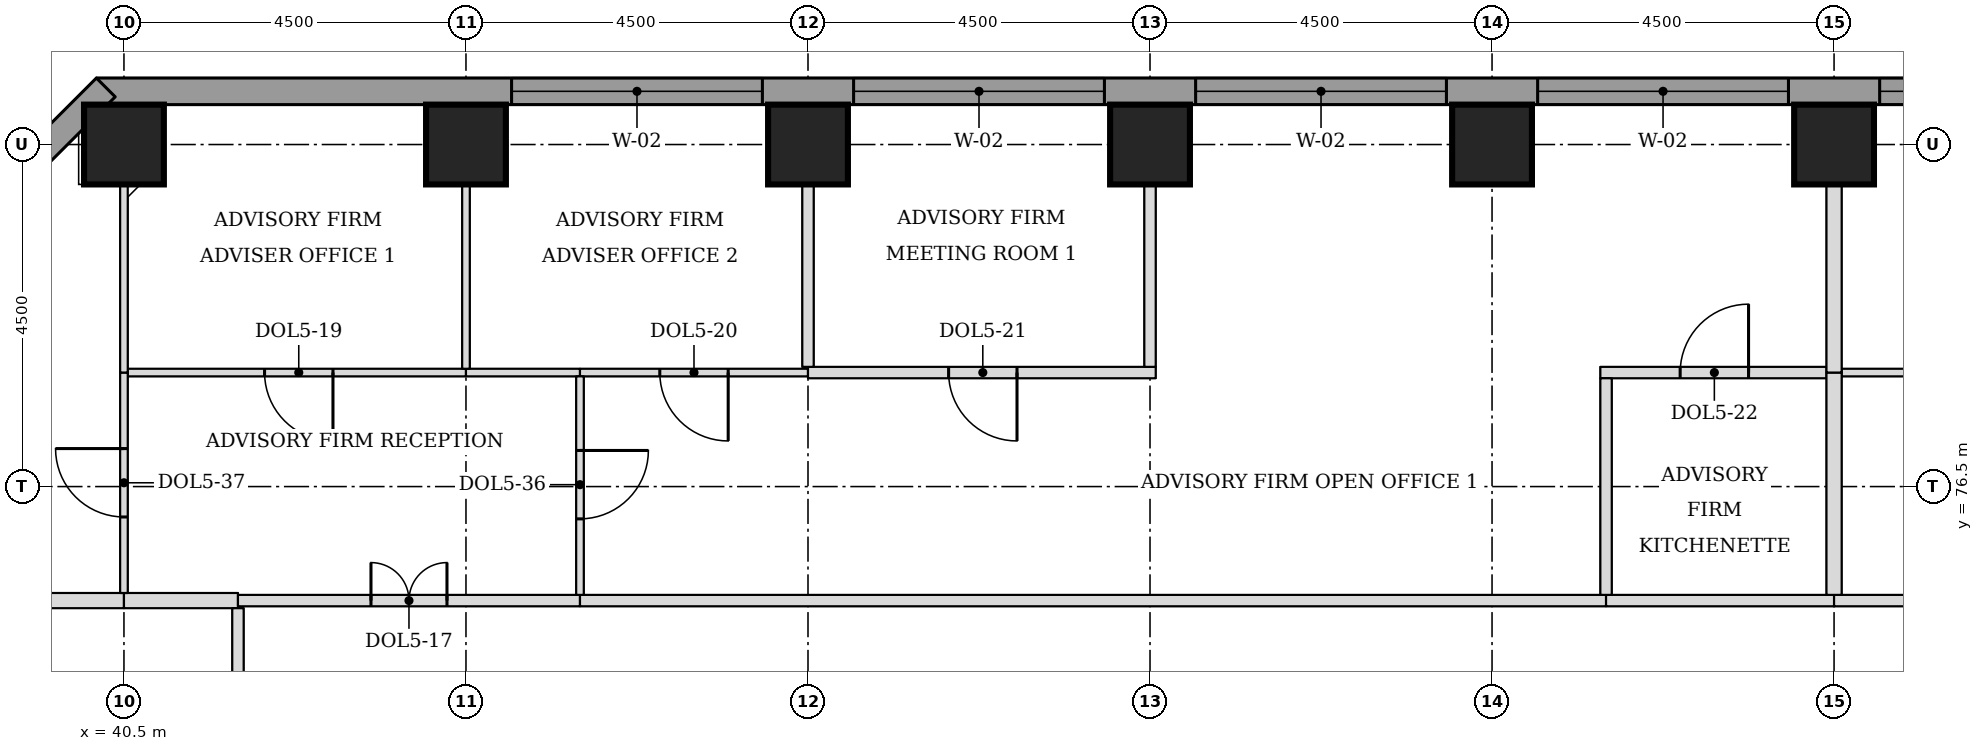
"""IFC4 building model, lengths in metres.
Left out: names, types, materials, properties, quantities, classifications, styles, units other than length and angle.
Written with IfcOpenShell. Run it as: python <this file> out.ifc"""

import sys

from ifc_helpers import new_model, si_unit, direction, frame, frame_2d, origin, origin_2d, place, context, subcontext, project, spatial, rectangle, extrude, element, fill, save


model = new_model("IFC4")
c1 = context("Model", 3, precision=1e-05, world=origin(), true_north=direction((0.0, 1.0)))
c2 = subcontext(c1, "Body", "Model", "MODEL_VIEW")
j1 = project(units=[si_unit("LENGTHUNIT", "METRE"), si_unit("PLANEANGLEUNIT", "RADIAN")], contexts=[c1])
p1 = place(None, origin())
s1 = spatial("IfcSite", under=j1, at=p1, CompositionType="ELEMENT")
p2 = place(p1, origin())
s2 = spatial("IfcBuilding", under=s1, at=p2, CompositionType="ELEMENT")
p3 = place(p2, frame((0.0, 0.0, 108.5)))
s3 = spatial("IfcBuildingStorey", under=s2, at=p3, CompositionType="ELEMENT", Elevation=108.5)
for number, where, z_axis, x_axis in (
    (1, (40.5, 81.0, 0.0), (0.0, 0.0, 1.0), (1.0, 0.0, 0.0)),
    (2, (45.0, 81.0, 0.0), (0.0, 0.0, 1.0), (1.0, 0.0, 0.0)),
    (3, (49.5, 81.0, 0.0), (0.0, 0.0, 1.0), (1.0, 0.0, 0.0)),
    (4, (54.0, 81.0, 0.0), (0.0, 0.0, 1.0), (1.0, 0.0, 0.0)),
    (5, (58.5, 81.0, 0.0), (0.0, 0.0, 1.0), (1.0, 0.0, 0.0)),
    (6, (63.0, 81.0, 0.0), (0.0, 0.0, 1.0), (1.0, 0.0, 0.0)),
):
    element("IfcColumn", number, at=place(p3, frame(where, z_axis=z_axis, x_axis=x_axis)), inside=s3, PredefinedType="COLUMN", context=c2, shape_type="SweptSolid", body=[
        extrude(rectangle(XDim=1.05, YDim=1.05, at=origin_2d()), origin(), (0.0, 0.0, 1.0), 3.7),
    ])
p4 = place(p3, frame((72.362, 81.7, 0.0), z_axis=(0.0, 0.0, 1.0), x_axis=(-1.0, 0.0, 0.0)))
e7 = element("IfcWall", 7, at=p4, inside=s3, PredefinedType="STANDARD", context=c2, shape_type="SweptSolid", body=[
    extrude(rectangle(XDim=32.225, YDim=0.35, at=frame_2d((16.112, 0.0))), origin(), (0.0, 0.0, 1.0), 3.525),
])
p5 = place(p4, frame((5.462, 0.0, 0.9)))
e8 = element("IfcOpeningElement", 8, at=p5, cuts=e7, PredefinedType="OPENING", context=c2, shape_type="SweptSolid", body=[
    extrude(rectangle(XDim=3.3, YDim=1.9, at=frame_2d((1.65, 0.95))), frame((0.0, 0.185, 0.0), z_axis=(0.0, -1.0, 0.0), x_axis=(1.0, 0.0, 0.0)), (0.0, 0.0, 1.0), 0.37),
])
p6 = place(p4, frame((9.962, 0.0, 0.9)))
e9 = element("IfcOpeningElement", 9, at=p6, cuts=e7, PredefinedType="OPENING", context=c2, shape_type="SweptSolid", body=[
    extrude(rectangle(XDim=3.3, YDim=1.9, at=frame_2d((1.65, 0.95))), frame((0.0, 0.185, 0.0), z_axis=(0.0, -1.0, 0.0), x_axis=(1.0, 0.0, 0.0)), (0.0, 0.0, 1.0), 0.37),
])
p7 = place(p4, frame((14.462, 0.0, 0.9)))
e10 = element("IfcOpeningElement", 10, at=p7, cuts=e7, PredefinedType="OPENING", context=c2, shape_type="SweptSolid", body=[
    extrude(rectangle(XDim=3.3, YDim=1.9, at=frame_2d((1.65, 0.95))), frame((0.0, 0.185, 0.0), z_axis=(0.0, -1.0, 0.0), x_axis=(1.0, 0.0, 0.0)), (0.0, 0.0, 1.0), 0.37),
])
p8 = place(p4, frame((18.962, 0.0, 0.9)))
e11 = element("IfcOpeningElement", 11, at=p8, cuts=e7, PredefinedType="OPENING", context=c2, shape_type="SweptSolid", body=[
    extrude(rectangle(XDim=3.3, YDim=1.9, at=frame_2d((1.65, 0.95))), frame((0.0, 0.185, 0.0), z_axis=(0.0, -1.0, 0.0), x_axis=(1.0, 0.0, 0.0)), (0.0, 0.0, 1.0), 0.37),
])
p9 = place(p4, frame((23.462, 0.0, 0.9)))
e12 = element("IfcOpeningElement", 12, at=p9, cuts=e7, PredefinedType="OPENING", context=c2, shape_type="SweptSolid", body=[
    extrude(rectangle(XDim=3.3, YDim=1.9, at=frame_2d((1.65, 0.95))), frame((0.0, 0.185, 0.0), z_axis=(0.0, -1.0, 0.0), x_axis=(1.0, 0.0, 0.0)), (0.0, 0.0, 1.0), 0.37),
])
p10 = place(p3, frame((40.261, 81.751, 0.0), z_axis=(0.0, 0.0, 1.0), x_axis=(-0.707106781187, -0.707106781187, 0.0)))
e13 = element("IfcWall", 13, at=p10, inside=s3, PredefinedType="STANDARD", context=c2, shape_type="SweptSolid", body=[
    extrude(rectangle(XDim=7.089, YDim=0.35, at=frame_2d((3.544, 0.0))), origin(), (0.0, 0.0, 1.0), 3.525),
])
p11 = place(p10, frame((1.894, 0.0, 0.9)))
e14 = element("IfcOpeningElement", 14, at=p11, cuts=e13, PredefinedType="OPENING", context=c2, shape_type="SweptSolid", body=[
    extrude(rectangle(XDim=3.3, YDim=1.9, at=frame_2d((1.65, 0.95))), frame((0.0, 0.185, 0.0), z_axis=(0.0, -1.0, 0.0), x_axis=(1.0, 0.0, 0.0)), (0.0, 0.0, 1.0), 0.37),
])
p12 = place(p3, frame((35.475, 75.0, 0.0), z_axis=(0.0, 0.0, 1.0), x_axis=(1.0, 0.0, 0.0)))
e15 = element("IfcWall", 15, at=p12, inside=s3, PredefinedType="PARTITIONING", context=c2, shape_type="SweptSolid", body=[
    extrude(rectangle(XDim=5.025, YDim=0.2, at=frame_2d((2.512, 0.0))), origin(), (0.0, 0.0, 1.0), 3.55),
])
p13 = place(p3, frame((40.5, 75.0, 0.0), z_axis=(0.0, 0.0, 1.0), x_axis=(1.0, 0.0, 0.0)))
e16 = element("IfcWall", 16, at=p13, inside=s3, PredefinedType="PARTITIONING", context=c2, shape_type="SweptSolid", body=[
    extrude(rectangle(XDim=1.5, YDim=0.2, at=frame_2d((0.75, 0.0))), origin(), (0.0, 0.0, 1.0), 3.55),
])
p14 = place(p3, frame((42.0, 75.0, 0.0), z_axis=(0.0, 0.0, 1.0), x_axis=(1.0, 0.0, 0.0)))
e17 = element("IfcWall", 17, at=p14, inside=s3, PredefinedType="PARTITIONING", context=c2, shape_type="SweptSolid", body=[
    extrude(rectangle(XDim=4.5, YDim=0.15, at=frame_2d((2.25, 0.0))), origin(), (0.0, 0.0, 1.0), 3.55),
])
p15 = place(p14, frame((1.75, 0.0, 0.0)))
e18 = element("IfcOpeningElement", 18, at=p15, cuts=e17, PredefinedType="OPENING", context=c2, shape_type="SweptSolid", body=[
    extrude(rectangle(XDim=1.0, YDim=2.1, at=frame_2d((0.5, 1.05))), frame((0.0, 0.085, 0.0), z_axis=(0.0, -1.0, 0.0), x_axis=(1.0, 0.0, 0.0)), (0.0, 0.0, 1.0), 0.17),
])
p16 = place(p3, frame((46.5, 75.0, 0.0), z_axis=(0.0, 0.0, 1.0), x_axis=(1.0, 0.0, 0.0)))
e19 = element("IfcWall", 19, at=p16, inside=s3, PredefinedType="PARTITIONING", context=c2, shape_type="SweptSolid", body=[
    extrude(rectangle(XDim=13.5, YDim=0.15, at=frame_2d((6.75, 0.0))), origin(), (0.0, 0.0, 1.0), 3.55),
])
p17 = place(p3, frame((60.0, 75.0, 0.0), z_axis=(0.0, 0.0, 1.0), x_axis=(1.0, 0.0, 0.0)))
e20 = element("IfcWall", 20, at=p17, inside=s3, PredefinedType="PARTITIONING", context=c2, shape_type="SweptSolid", body=[
    extrude(rectangle(XDim=3.0, YDim=0.15, at=frame_2d((1.5, 0.0))), origin(), (0.0, 0.0, 1.0), 3.55),
])
p18 = place(p3, frame((63.0, 75.0, 0.0), z_axis=(0.0, 0.0, 1.0), x_axis=(1.0, 0.0, 0.0)))
e21 = element("IfcWall", 21, at=p18, inside=s3, PredefinedType="PARTITIONING", context=c2, shape_type="SweptSolid", body=[
    extrude(rectangle(XDim=7.5, YDim=0.15, at=frame_2d((3.75, 0.0))), origin(), (0.0, 0.0, 1.0), 3.55),
])
p19 = place(p18, frame((3.25, 0.0, 0.0)))
e22 = element("IfcOpeningElement", 22, at=p19, cuts=e21, PredefinedType="OPENING", context=c2, shape_type="SweptSolid", body=[
    extrude(rectangle(XDim=1.0, YDim=2.1, at=frame_2d((0.5, 1.05))), frame((0.0, 0.085, 0.0), z_axis=(0.0, -1.0, 0.0), x_axis=(1.0, 0.0, 0.0)), (0.0, 0.0, 1.0), 0.17),
])
p20 = place(p3, frame((40.55, 78.0, 0.0), z_axis=(0.0, 0.0, 1.0), x_axis=(1.0, 0.0, 0.0)))
e23 = element("IfcWall", 23, at=p20, inside=s3, PredefinedType="PARTITIONING", context=c2, shape_type="SweptSolid", body=[
    extrude(rectangle(XDim=4.45, YDim=0.1, at=frame_2d((2.225, 0.0))), origin(), (0.0, 0.0, 1.0), 3.55),
])
p21 = place(p20, frame((1.8, 0.0, 0.0)))
e24 = element("IfcOpeningElement", 24, at=p21, cuts=e23, PredefinedType="OPENING", context=c2, shape_type="SweptSolid", body=[
    extrude(rectangle(XDim=0.9, YDim=2.1, at=frame_2d((0.45, 1.05))), frame((0.0, 0.06, 0.0), z_axis=(0.0, -1.0, 0.0), x_axis=(1.0, 0.0, 0.0)), (0.0, 0.0, 1.0), 0.12),
])
p22 = place(p3, frame((45.0, 78.0, 0.0), z_axis=(0.0, 0.0, 1.0), x_axis=(1.0, 0.0, 0.0)))
e25 = element("IfcWall", 25, at=p22, inside=s3, PredefinedType="PARTITIONING", context=c2, shape_type="SweptSolid", body=[
    extrude(rectangle(XDim=1.5, YDim=0.1, at=frame_2d((0.75, 0.0))), origin(), (0.0, 0.0, 1.0), 3.55),
])
p23 = place(p3, frame((46.5, 78.0, 0.0), z_axis=(0.0, 0.0, 1.0), x_axis=(1.0, 0.0, 0.0)))
e26 = element("IfcWall", 26, at=p23, inside=s3, PredefinedType="PARTITIONING", context=c2, shape_type="SweptSolid", body=[
    extrude(rectangle(XDim=3.0, YDim=0.1, at=frame_2d((1.5, 0.0))), origin(), (0.0, 0.0, 1.0), 3.55),
])
p24 = place(p23, frame((1.05, 0.0, 0.0)))
e27 = element("IfcOpeningElement", 27, at=p24, cuts=e26, PredefinedType="OPENING", context=c2, shape_type="SweptSolid", body=[
    extrude(rectangle(XDim=0.9, YDim=2.1, at=frame_2d((0.45, 1.05))), frame((0.0, 0.06, 0.0), z_axis=(0.0, -1.0, 0.0), x_axis=(1.0, 0.0, 0.0)), (0.0, 0.0, 1.0), 0.12),
])
p25 = place(p3, frame((49.5, 78.0, 0.0), z_axis=(0.0, 0.0, 1.0), x_axis=(1.0, 0.0, 0.0)))
e28 = element("IfcWall", 28, at=p25, inside=s3, PredefinedType="PARTITIONING", context=c2, shape_type="SweptSolid", body=[
    extrude(rectangle(XDim=4.575, YDim=0.15, at=frame_2d((2.288, 0.0))), origin(), (0.0, 0.0, 1.0), 3.55),
])
p26 = place(p25, frame((1.85, 0.0, 0.0)))
e29 = element("IfcOpeningElement", 29, at=p26, cuts=e28, PredefinedType="OPENING", context=c2, shape_type="SweptSolid", body=[
    extrude(rectangle(XDim=0.9, YDim=2.1, at=frame_2d((0.45, 1.05))), frame((0.0, 0.085, 0.0), z_axis=(0.0, -1.0, 0.0), x_axis=(1.0, 0.0, 0.0)), (0.0, 0.0, 1.0), 0.17),
])
p27 = place(p3, frame((59.925, 78.0, 0.0), z_axis=(0.0, 0.0, 1.0), x_axis=(1.0, 0.0, 0.0)))
e30 = element("IfcWall", 30, at=p27, inside=s3, PredefinedType="PARTITIONING", context=c2, shape_type="SweptSolid", body=[
    extrude(rectangle(XDim=2.975, YDim=0.15, at=frame_2d((1.487, 0.0))), origin(), (0.0, 0.0, 1.0), 3.55),
])
p28 = place(p27, frame((1.05, 0.0, 0.0)))
e31 = element("IfcOpeningElement", 31, at=p28, cuts=e30, PredefinedType="OPENING", context=c2, shape_type="SweptSolid", body=[
    extrude(rectangle(XDim=0.9, YDim=2.1, at=frame_2d((0.45, 1.05))), frame((0.0, 0.085, 0.0), z_axis=(0.0, -1.0, 0.0), x_axis=(1.0, 0.0, 0.0)), (0.0, 0.0, 1.0), 0.17),
])
p29 = place(p3, frame((63.1, 78.0, 0.0), z_axis=(0.0, 0.0, 1.0), x_axis=(1.0, 0.0, 0.0)))
e32 = element("IfcWall", 32, at=p29, inside=s3, PredefinedType="PARTITIONING", context=c2, shape_type="SweptSolid", body=[
    extrude(rectangle(XDim=4.4, YDim=0.1, at=frame_2d((2.2, 0.0))), origin(), (0.0, 0.0, 1.0), 3.55),
])
p30 = place(p29, frame((1.75, 0.0, 0.0)))
e33 = element("IfcOpeningElement", 33, at=p30, cuts=e32, PredefinedType="OPENING", context=c2, shape_type="SweptSolid", body=[
    extrude(rectangle(XDim=0.9, YDim=2.1, at=frame_2d((0.45, 1.05))), frame((0.0, 0.06, 0.0), z_axis=(0.0, -1.0, 0.0), x_axis=(1.0, 0.0, 0.0)), (0.0, 0.0, 1.0), 0.12),
])
p31 = place(p3, frame((42.0, 57.075, 0.0), z_axis=(0.0, 0.0, 1.0), x_axis=(0.0, 1.0, 0.0)))
e34 = element("IfcWall", 34, at=p31, inside=s3, PredefinedType="PARTITIONING", context=c2, shape_type="SweptSolid", body=[
    extrude(rectangle(XDim=17.825, YDim=0.15, at=frame_2d((8.913, 0.0))), origin(), (0.0, 0.0, 1.0), 3.55),
])
p32 = place(p3, frame((46.5, 75.075, 0.0), z_axis=(0.0, 0.0, 1.0), x_axis=(0.0, 1.0, 0.0)))
e35 = element("IfcWall", 35, at=p32, inside=s3, PredefinedType="PARTITIONING", context=c2, shape_type="SweptSolid", body=[
    extrude(rectangle(XDim=2.875, YDim=0.1, at=frame_2d((1.438, 0.0))), origin(), (0.0, 0.0, 1.0), 3.022),
])
p33 = place(p32, frame((1.0, 0.0, 0.0)))
e36 = element("IfcOpeningElement", 36, at=p33, cuts=e35, PredefinedType="OPENING", context=c2, shape_type="SweptSolid", body=[
    extrude(rectangle(XDim=0.9, YDim=2.1, at=frame_2d((0.45, 1.05))), frame((0.0, 0.06, 0.0), z_axis=(0.0, -1.0, 0.0), x_axis=(1.0, 0.0, 0.0)), (0.0, 0.0, 1.0), 0.12),
])
p34 = place(p3, frame((60.0, 75.075, 0.0), z_axis=(0.0, 0.0, 1.0), x_axis=(0.0, 1.0, 0.0)))
e37 = element("IfcWall", 37, at=p34, inside=s3, PredefinedType="PARTITIONING", context=c2, shape_type="SweptSolid", body=[
    extrude(rectangle(XDim=2.85, YDim=0.15, at=frame_2d((1.425, 0.0))), origin(), (0.0, 0.0, 1.0), 3.55),
])
p35 = place(p3, frame((63.0, 75.075, 0.0), z_axis=(0.0, 0.0, 1.0), x_axis=(0.0, 1.0, 0.0)))
e38 = element("IfcWall", 38, at=p35, inside=s3, PredefinedType="PARTITIONING", context=c2, shape_type="SweptSolid", body=[
    extrude(rectangle(XDim=2.925, YDim=0.2, at=frame_2d((1.462, 0.0))), origin(), (0.0, 0.0, 1.0), 3.55),
])
p36 = place(p3, frame((40.5, 75.1, 0.0), z_axis=(0.0, 0.0, 1.0), x_axis=(0.0, 1.0, 0.0)))
e39 = element("IfcWall", 39, at=p36, inside=s3, PredefinedType="PARTITIONING", context=c2, shape_type="SweptSolid", body=[
    extrude(rectangle(XDim=2.9, YDim=0.1, at=frame_2d((1.45, 0.0))), origin(), (0.0, 0.0, 1.0), 3.55),
])
p37 = place(p36, frame((1.0, 0.0, 0.0)))
e40 = element("IfcOpeningElement", 40, at=p37, cuts=e39, PredefinedType="OPENING", context=c2, shape_type="SweptSolid", body=[
    extrude(rectangle(XDim=0.9, YDim=2.1, at=frame_2d((0.45, 1.05))), frame((0.0, 0.06, 0.0), z_axis=(0.0, -1.0, 0.0), x_axis=(1.0, 0.0, 0.0)), (0.0, 0.0, 1.0), 0.12),
])
p38 = place(p3, frame((40.5, 78.0, 0.0), z_axis=(0.0, 0.0, 1.0), x_axis=(0.0, 1.0, 0.0)))
e41 = element("IfcWall", 41, at=p38, inside=s3, PredefinedType="PARTITIONING", context=c2, shape_type="SweptSolid", body=[
    extrude(rectangle(XDim=2.475, YDim=0.1, at=frame_2d((1.238, 0.0))), origin(), (0.0, 0.0, 1.0), 3.55),
])
p39 = place(p3, frame((63.0, 78.0, 0.0), z_axis=(0.0, 0.0, 1.0), x_axis=(0.0, 1.0, 0.0)))
e42 = element("IfcWall", 42, at=p39, inside=s3, PredefinedType="PARTITIONING", context=c2, shape_type="SweptSolid", body=[
    extrude(rectangle(XDim=3.525, YDim=0.2, at=frame_2d((1.762, 0.0))), origin(), (0.0, 0.0, 1.0), 3.55),
])
p40 = place(p3, frame((45.0, 78.05, 0.0), z_axis=(0.0, 0.0, 1.0), x_axis=(0.0, 1.0, 0.0)))
e43 = element("IfcWall", 43, at=p40, inside=s3, PredefinedType="PARTITIONING", context=c2, shape_type="SweptSolid", body=[
    extrude(rectangle(XDim=3.475, YDim=0.1, at=frame_2d((1.737, 0.0))), origin(), (0.0, 0.0, 1.0), 3.55),
])
for number, where, z_axis, x_axis in (
    (44, (49.5, 78.075, 0.0), (0.0, 0.0, 1.0), (0.0, 1.0, 0.0)),
    (45, (54.0, 78.075, 0.0), (0.0, 0.0, 1.0), (0.0, 1.0, 0.0)),
):
    element("IfcWall", number, at=place(p3, frame(where, z_axis=z_axis, x_axis=x_axis)), inside=s3, PredefinedType="PARTITIONING", context=c2, shape_type="SweptSolid", body=[
        extrude(rectangle(XDim=3.45, YDim=0.15, at=frame_2d((1.725, 0.0))), origin(), (0.0, 0.0, 1.0), 3.55),
    ])
p41 = place(p5, origin())
e46 = element("IfcWindow", 46, at=p41, inside=s3, PartitioningType="SINGLE_PANEL", PredefinedType="WINDOW", context=c2, shape_type="SweptSolid", body=[
    extrude(rectangle(XDim=3.3, YDim=1.9, at=frame_2d((1.65, 0.95))), frame((0.0, 0.085, 0.0), z_axis=(0.0, -1.0, 0.0), x_axis=(1.0, 0.0, 0.0)), (0.0, 0.0, 1.0), 0.06),
])
fill(e8, e46)
p42 = place(p6, origin())
e47 = element("IfcWindow", 47, at=p42, inside=s3, PartitioningType="SINGLE_PANEL", PredefinedType="WINDOW", context=c2, shape_type="SweptSolid", body=[
    extrude(rectangle(XDim=3.3, YDim=1.9, at=frame_2d((1.65, 0.95))), frame((0.0, 0.085, 0.0), z_axis=(0.0, -1.0, 0.0), x_axis=(1.0, 0.0, 0.0)), (0.0, 0.0, 1.0), 0.06),
])
fill(e9, e47)
p43 = place(p7, origin())
e48 = element("IfcWindow", 48, at=p43, inside=s3, PartitioningType="SINGLE_PANEL", PredefinedType="WINDOW", context=c2, shape_type="SweptSolid", body=[
    extrude(rectangle(XDim=3.3, YDim=1.9, at=frame_2d((1.65, 0.95))), frame((0.0, 0.085, 0.0), z_axis=(0.0, -1.0, 0.0), x_axis=(1.0, 0.0, 0.0)), (0.0, 0.0, 1.0), 0.06),
])
fill(e10, e48)
p44 = place(p8, origin())
e49 = element("IfcWindow", 49, at=p44, inside=s3, PartitioningType="SINGLE_PANEL", PredefinedType="WINDOW", context=c2, shape_type="SweptSolid", body=[
    extrude(rectangle(XDim=3.3, YDim=1.9, at=frame_2d((1.65, 0.95))), frame((0.0, 0.085, 0.0), z_axis=(0.0, -1.0, 0.0), x_axis=(1.0, 0.0, 0.0)), (0.0, 0.0, 1.0), 0.06),
])
fill(e11, e49)
p45 = place(p9, origin())
e50 = element("IfcWindow", 50, at=p45, inside=s3, PartitioningType="SINGLE_PANEL", PredefinedType="WINDOW", context=c2, shape_type="SweptSolid", body=[
    extrude(rectangle(XDim=3.3, YDim=1.9, at=frame_2d((1.65, 0.95))), frame((0.0, 0.085, 0.0), z_axis=(0.0, -1.0, 0.0), x_axis=(1.0, 0.0, 0.0)), (0.0, 0.0, 1.0), 0.06),
])
fill(e12, e50)
p46 = place(p15, origin())
e51 = element("IfcDoor", 51, at=p46, inside=s3, OperationType="DOUBLE_DOOR_SINGLE_SWING", PredefinedType="DOOR", context=c2, shape_type="SweptSolid", body=[
    extrude(rectangle(XDim=1.0, YDim=2.1, at=frame_2d((0.5, 1.05))), frame((0.0, 0.025, 0.0), z_axis=(0.0, -1.0, 0.0), x_axis=(1.0, 0.0, 0.0)), (0.0, 0.0, 1.0), 0.05),
])
fill(e18, e51)
p47 = place(p33, frame((0.9, 0.0, 0.0), z_axis=(0.0, 0.0, 1.0), x_axis=(-1.0, 0.0, 0.0)))
e52 = element("IfcDoor", 52, at=p47, inside=s3, OperationType="SINGLE_SWING_LEFT", PredefinedType="DOOR", context=c2, shape_type="SweptSolid", body=[
    extrude(rectangle(XDim=0.9, YDim=2.1, at=frame_2d((0.45, 1.05))), frame((0.0, 0.025, 0.0), z_axis=(0.0, -1.0, 0.0), x_axis=(1.0, 0.0, 0.0)), (0.0, 0.0, 1.0), 0.05),
])
fill(e36, e52)
p48 = place(p37, origin())
e53 = element("IfcDoor", 53, at=p48, inside=s3, OperationType="SINGLE_SWING_RIGHT", PredefinedType="DOOR", context=c2, shape_type="SweptSolid", body=[
    extrude(rectangle(XDim=0.9, YDim=2.1, at=frame_2d((0.45, 1.05))), frame((0.0, 0.025, 0.0), z_axis=(0.0, -1.0, 0.0), x_axis=(1.0, 0.0, 0.0)), (0.0, 0.0, 1.0), 0.05),
])
fill(e40, e53)
p49 = place(p21, frame((0.9, 0.0, 0.0), z_axis=(0.0, 0.0, 1.0), x_axis=(-1.0, 0.0, 0.0)))
e54 = element("IfcDoor", 54, at=p49, inside=s3, OperationType="SINGLE_SWING_LEFT", PredefinedType="DOOR", context=c2, shape_type="SweptSolid", body=[
    extrude(rectangle(XDim=0.9, YDim=2.1, at=frame_2d((0.45, 1.05))), frame((0.0, 0.025, 0.0), z_axis=(0.0, -1.0, 0.0), x_axis=(1.0, 0.0, 0.0)), (0.0, 0.0, 1.0), 0.05),
])
fill(e24, e54)
p50 = place(p24, frame((0.9, 0.0, 0.0), z_axis=(0.0, 0.0, 1.0), x_axis=(-1.0, 0.0, 0.0)))
e55 = element("IfcDoor", 55, at=p50, inside=s3, OperationType="SINGLE_SWING_LEFT", PredefinedType="DOOR", context=c2, shape_type="SweptSolid", body=[
    extrude(rectangle(XDim=0.9, YDim=2.1, at=frame_2d((0.45, 1.05))), frame((0.0, 0.025, 0.0), z_axis=(0.0, -1.0, 0.0), x_axis=(1.0, 0.0, 0.0)), (0.0, 0.0, 1.0), 0.05),
])
fill(e27, e55)
p51 = place(p28, origin())
e56 = element("IfcDoor", 56, at=p51, inside=s3, OperationType="SINGLE_SWING_RIGHT", PredefinedType="DOOR", context=c2, shape_type="SweptSolid", body=[
    extrude(rectangle(XDim=0.9, YDim=2.1, at=frame_2d((0.45, 1.05))), frame((0.0, 0.025, 0.0), z_axis=(0.0, -1.0, 0.0), x_axis=(1.0, 0.0, 0.0)), (0.0, 0.0, 1.0), 0.05),
])
fill(e31, e56)
p52 = place(p26, frame((0.9, 0.0, 0.0), z_axis=(0.0, 0.0, 1.0), x_axis=(-1.0, 0.0, 0.0)))
e57 = element("IfcDoor", 57, at=p52, inside=s3, OperationType="SINGLE_SWING_LEFT", PredefinedType="DOOR", context=c2, shape_type="SweptSolid", body=[
    extrude(rectangle(XDim=0.9, YDim=2.1, at=frame_2d((0.45, 1.05))), frame((0.0, 0.025, 0.0), z_axis=(0.0, -1.0, 0.0), x_axis=(1.0, 0.0, 0.0)), (0.0, 0.0, 1.0), 0.05),
])
fill(e29, e57)
save(model, sys.argv[1])
